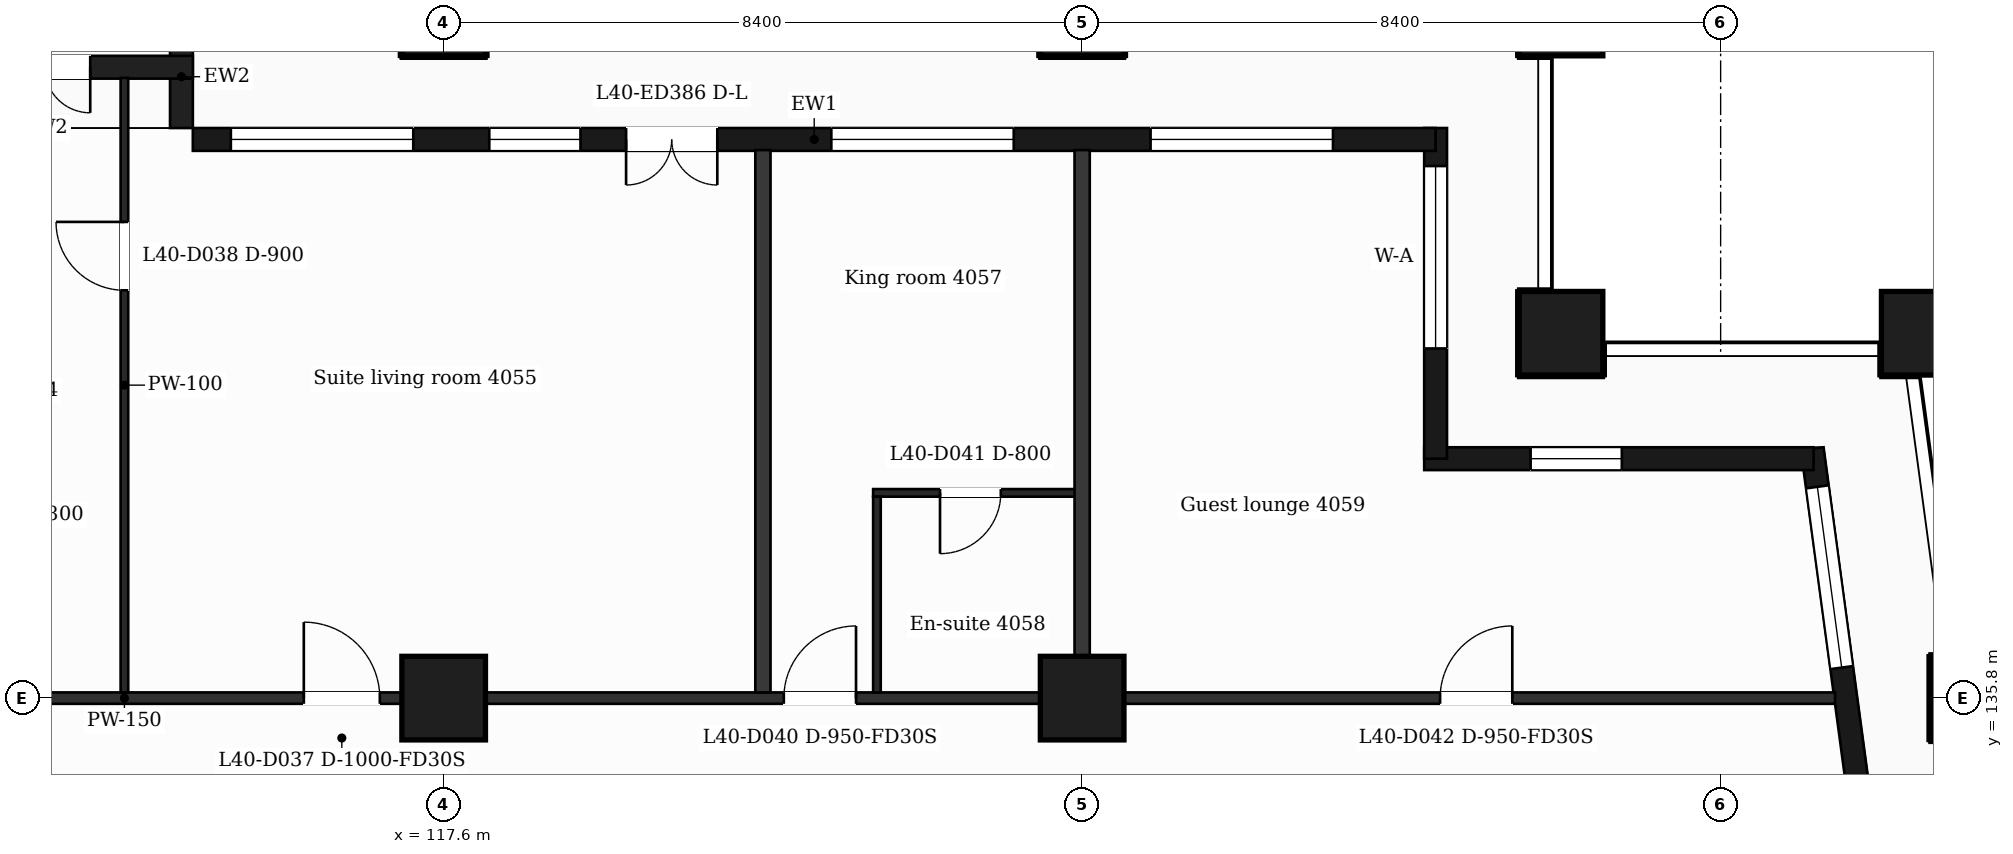
"""IFC4 building model, lengths in metres.
Left out: names, types, materials, properties, quantities, classifications, styles, units other than length and angle.
Written with IfcOpenShell. Run it as: python <this file> out.ifc"""

import sys

from ifc_helpers import new_model, si_unit, direction, frame, frame_2d, origin, origin_2d, place, context, subcontext, project, spatial, rectangle, extrude, element, fill, save


model = new_model("IFC4")
c1 = context("Model", 3, precision=1e-05, world=origin(), true_north=direction((0.0, 1.0)))
c2 = subcontext(c1, "Body", "Model", "MODEL_VIEW")
j1 = project(units=[si_unit("LENGTHUNIT", "METRE"), si_unit("PLANEANGLEUNIT", "RADIAN")], contexts=[c1])
p1 = place(None, origin())
s1 = spatial("IfcSite", under=j1, at=p1, CompositionType="ELEMENT")
p2 = place(p1, origin())
s2 = spatial("IfcBuilding", under=s1, at=p2, CompositionType="ELEMENT")
p3 = place(p2, frame((0.0, 0.0, 170.0)))
s3 = spatial("IfcBuildingStorey", under=s2, at=p3, CompositionType="ELEMENT", Elevation=170.0)
for number, where, z_axis, x_axis in (
    (1, (132.3, 140.6, 0.0), (0.0, 0.0, 1.0), (1.0, 0.0, 0.0)),
    (2, (137.065, 140.6, 0.0), (0.0, 0.0, 1.0), (1.0, 0.0, 0.0)),
    (3, (117.6, 135.8, 0.0), (0.0, 0.0, 1.0), (1.0, 0.0, 0.0)),
    (4, (126.0, 135.8, 0.0), (0.0, 0.0, 1.0), (1.0, 0.0, 0.0)),
    (5, (137.711, 135.8, 0.0), (0.0, 0.0, 1.0), (1.0, 0.0, 0.0)),
    (6, (117.6, 144.8, 0.0), (0.0, 0.0, 1.0), (1.0, 0.0, 0.0)),
    (7, (126.0, 144.8, 0.0), (0.0, 0.0, 1.0), (1.0, 0.0, 0.0)),
    (8, (132.3, 144.8, 0.0), (0.0, 0.0, 1.0), (1.0, 0.0, 0.0)),
):
    element("IfcColumn", number, at=place(p3, frame(where, z_axis=z_axis, x_axis=x_axis)), inside=s3, PredefinedType="COLUMN", context=c2, shape_type="SweptSolid", body=[
        extrude(rectangle(XDim=1.1, YDim=1.1, at=origin_2d()), origin(), (0.0, 0.0, 1.0), 3.7),
    ])
p4 = place(p3, frame((136.504, 132.4, 0.0), z_axis=(0.0, 0.0, 1.0), x_axis=(-0.133399697462, 0.99106231929, 0.0)))
e9 = element("IfcWall", 9, at=p4, inside=s3, PredefinedType="SOLIDWALL", context=c2, shape_type="SweptSolid", body=[
    extrude(rectangle(XDim=6.74, YDim=0.3, at=frame_2d((3.37, 0.0))), origin(), (0.0, 0.0, 1.0), 3.38),
])
p5 = place(p4, frame((1.115, 0.0, 0.0)))
e10 = element("IfcOpeningElement", 10, at=p5, cuts=e9, PredefinedType="OPENING", context=c2, shape_type="SweptSolid", body=[
    extrude(rectangle(XDim=1.2, YDim=2.4, at=frame_2d((0.6, 1.2))), frame((0.0, 0.16, 0.0), z_axis=(0.0, -1.0, 0.0), x_axis=(1.0, 0.0, 0.0)), (0.0, 0.0, 1.0), 0.32),
])
p6 = place(p4, frame((3.835, 0.0, 0.9)))
e11 = element("IfcOpeningElement", 11, at=p6, cuts=e9, PredefinedType="OPENING", context=c2, shape_type="SweptSolid", body=[
    extrude(rectangle(XDim=2.4, YDim=2.1, at=frame_2d((1.2, 1.05))), frame((0.0, 0.16, 0.0), z_axis=(0.0, -1.0, 0.0), x_axis=(1.0, 0.0, 0.0)), (0.0, 0.0, 1.0), 0.32),
])
p7 = place(p3, frame((135.623, 138.95, 0.0), z_axis=(0.0, 0.0, 1.0), x_axis=(-1.0, 0.0, 0.0)))
e12 = element("IfcWall", 12, at=p7, inside=s3, PredefinedType="SOLIDWALL", context=c2, shape_type="SweptSolid", body=[
    extrude(rectangle(XDim=5.123, YDim=0.3, at=frame_2d((2.561, 0.0))), origin(), (0.0, 0.0, 1.0), 3.38),
])
p8 = place(p7, frame((2.523, 0.0, 0.9)))
e13 = element("IfcOpeningElement", 13, at=p8, cuts=e12, PredefinedType="OPENING", context=c2, shape_type="SweptSolid", body=[
    extrude(rectangle(XDim=1.2, YDim=2.1, at=frame_2d((0.6, 1.05))), frame((0.0, 0.16, 0.0), z_axis=(0.0, -1.0, 0.0), x_axis=(1.0, 0.0, 0.0)), (0.0, 0.0, 1.0), 0.32),
])
p9 = place(p3, frame((130.65, 138.95, 0.0), z_axis=(0.0, 0.0, 1.0), x_axis=(0.0, 1.0, 0.0)))
e14 = element("IfcWall", 14, at=p9, inside=s3, PredefinedType="SOLIDWALL", context=c2, shape_type="SweptSolid", body=[
    extrude(rectangle(XDim=4.35, YDim=0.3, at=frame_2d((2.175, 0.0))), origin(), (0.0, 0.0, 1.0), 3.38),
])
p10 = place(p9, frame((1.45, 0.0, 0.9)))
e15 = element("IfcOpeningElement", 15, at=p10, cuts=e14, PredefinedType="OPENING", context=c2, shape_type="SweptSolid", body=[
    extrude(rectangle(XDim=2.4, YDim=2.1, at=frame_2d((1.2, 1.05))), frame((0.0, 0.16, 0.0), z_axis=(0.0, -1.0, 0.0), x_axis=(1.0, 0.0, 0.0)), (0.0, 0.0, 1.0), 0.32),
])
p11 = place(p3, frame((130.65, 143.15, 0.0), z_axis=(0.0, 0.0, 1.0), x_axis=(-1.0, 0.0, 0.0)))
e16 = element("IfcWall", 16, at=p11, inside=s3, PredefinedType="SOLIDWALL", context=c2, shape_type="SweptSolid", body=[
    extrude(rectangle(XDim=16.35, YDim=0.3, at=frame_2d((8.175, 0.0))), origin(), (0.0, 0.0, 1.0), 3.38),
])
p12 = place(p11, frame((1.35, 0.0, 0.9)))
e17 = element("IfcOpeningElement", 17, at=p12, cuts=e16, PredefinedType="OPENING", context=c2, shape_type="SweptSolid", body=[
    extrude(rectangle(XDim=2.4, YDim=2.1, at=frame_2d((1.2, 1.05))), frame((0.0, 0.16, 0.0), z_axis=(0.0, -1.0, 0.0), x_axis=(1.0, 0.0, 0.0)), (0.0, 0.0, 1.0), 0.32),
])
p13 = place(p11, frame((5.55, 0.0, 0.9)))
e18 = element("IfcOpeningElement", 18, at=p13, cuts=e16, PredefinedType="OPENING", context=c2, shape_type="SweptSolid", body=[
    extrude(rectangle(XDim=2.4, YDim=2.1, at=frame_2d((1.2, 1.05))), frame((0.0, 0.16, 0.0), z_axis=(0.0, -1.0, 0.0), x_axis=(1.0, 0.0, 0.0)), (0.0, 0.0, 1.0), 0.32),
])
p14 = place(p11, frame((9.45, 0.0, 0.0)))
e19 = element("IfcOpeningElement", 19, at=p14, cuts=e16, PredefinedType="OPENING", context=c2, shape_type="SweptSolid", body=[
    extrude(rectangle(XDim=1.2, YDim=2.4, at=frame_2d((0.6, 1.2))), frame((0.0, 0.16, 0.0), z_axis=(0.0, -1.0, 0.0), x_axis=(1.0, 0.0, 0.0)), (0.0, 0.0, 1.0), 0.32),
])
p15 = place(p11, frame((11.25, 0.0, 0.9)))
e20 = element("IfcOpeningElement", 20, at=p15, cuts=e16, PredefinedType="OPENING", context=c2, shape_type="SweptSolid", body=[
    extrude(rectangle(XDim=1.2, YDim=2.1, at=frame_2d((0.6, 1.05))), frame((0.0, 0.16, 0.0), z_axis=(0.0, -1.0, 0.0), x_axis=(1.0, 0.0, 0.0)), (0.0, 0.0, 1.0), 0.32),
])
p16 = place(p11, frame((13.45, 0.0, 0.9)))
e21 = element("IfcOpeningElement", 21, at=p16, cuts=e16, PredefinedType="OPENING", context=c2, shape_type="SweptSolid", body=[
    extrude(rectangle(XDim=2.4, YDim=2.1, at=frame_2d((1.2, 1.05))), frame((0.0, 0.16, 0.0), z_axis=(0.0, -1.0, 0.0), x_axis=(1.0, 0.0, 0.0)), (0.0, 0.0, 1.0), 0.32),
])
p17 = place(p3, frame((114.15, 143.3, 0.0), z_axis=(0.0, 0.0, 1.0), x_axis=(0.0, 1.0, 0.0)))
e22 = element("IfcWall", 22, at=p17, inside=s3, PredefinedType="SOLIDWALL", context=c2, shape_type="SweptSolid", body=[
    extrude(rectangle(XDim=1.35, YDim=0.3, at=frame_2d((0.675, 0.0))), origin(), (0.0, 0.0, 1.0), 3.38),
])
p18 = place(p3, frame((114.3, 144.1, 0.0), z_axis=(0.0, 0.0, 1.0), x_axis=(-1.0, 0.0, 0.0)))
e23 = element("IfcWall", 23, at=p18, inside=s3, PredefinedType="SOLIDWALL", context=c2, shape_type="SweptSolid", body=[
    extrude(rectangle(XDim=3.9, YDim=0.3, at=frame_2d((1.95, 0.0))), origin(), (0.0, 0.0, 1.0), 3.38),
])
p19 = place(p18, frame((1.35, 0.0, 0.0)))
e24 = element("IfcOpeningElement", 24, at=p19, cuts=e23, PredefinedType="OPENING", context=c2, shape_type="SweptSolid", body=[
    extrude(rectangle(XDim=1.2, YDim=2.4, at=frame_2d((0.6, 1.2))), frame((0.0, 0.16, 0.0), z_axis=(0.0, -1.0, 0.0), x_axis=(1.0, 0.0, 0.0)), (0.0, 0.0, 1.0), 0.32),
])
p20 = place(p3, frame((90.895, 135.8, 0.0), z_axis=(0.0, 0.0, 1.0), x_axis=(1.0, 0.0, 0.0)))
e25 = element("IfcWall", 25, at=p20, inside=s3, PredefinedType="PARTITIONING", context=c2, shape_type="SweptSolid", body=[
    extrude(rectangle(XDim=45.011, YDim=0.15, at=frame_2d((22.505, 0.0))), origin(), (0.0, 0.0, 1.0), 3.38),
])
p21 = place(p20, frame((7.675, 0.0, 0.0)))
e26 = element("IfcOpeningElement", 26, at=p21, cuts=e25, PredefinedType="OPENING", context=c2, shape_type="SweptSolid", body=[
    extrude(rectangle(XDim=1.0, YDim=2.1, at=frame_2d((0.5, 1.05))), frame((0.0, 0.085, 0.0), z_axis=(0.0, -1.0, 0.0), x_axis=(1.0, 0.0, 0.0)), (0.0, 0.0, 1.0), 0.17),
])
p22 = place(p20, frame((11.505, 0.0, 0.0)))
e27 = element("IfcOpeningElement", 27, at=p22, cuts=e25, PredefinedType="OPENING", context=c2, shape_type="SweptSolid", body=[
    extrude(rectangle(XDim=1.0, YDim=2.1, at=frame_2d((0.5, 1.05))), frame((0.0, 0.085, 0.0), z_axis=(0.0, -1.0, 0.0), x_axis=(1.0, 0.0, 0.0)), (0.0, 0.0, 1.0), 0.17),
])
p23 = place(p20, frame((24.865, 0.0, 0.0)))
e28 = element("IfcOpeningElement", 28, at=p23, cuts=e25, PredefinedType="OPENING", context=c2, shape_type="SweptSolid", body=[
    extrude(rectangle(XDim=1.0, YDim=2.1, at=frame_2d((0.5, 1.05))), frame((0.0, 0.085, 0.0), z_axis=(0.0, -1.0, 0.0), x_axis=(1.0, 0.0, 0.0)), (0.0, 0.0, 1.0), 0.17),
])
p24 = place(p20, frame((31.18, 0.0, 0.0)))
e29 = element("IfcOpeningElement", 29, at=p24, cuts=e25, PredefinedType="OPENING", context=c2, shape_type="SweptSolid", body=[
    extrude(rectangle(XDim=0.95, YDim=2.1, at=frame_2d((0.475, 1.05))), frame((0.0, 0.085, 0.0), z_axis=(0.0, -1.0, 0.0), x_axis=(1.0, 0.0, 0.0)), (0.0, 0.0, 1.0), 0.17),
])
p25 = place(p20, frame((39.814, 0.0, 0.0)))
e30 = element("IfcOpeningElement", 30, at=p25, cuts=e25, PredefinedType="OPENING", context=c2, shape_type="SweptSolid", body=[
    extrude(rectangle(XDim=0.95, YDim=2.1, at=frame_2d((0.475, 1.05))), frame((0.0, 0.085, 0.0), z_axis=(0.0, -1.0, 0.0), x_axis=(1.0, 0.0, 0.0)), (0.0, 0.0, 1.0), 0.17),
])
p26 = place(p3, frame((123.25, 138.5, 0.0), z_axis=(0.0, 0.0, 1.0), x_axis=(1.0, 0.0, 0.0)))
e31 = element("IfcWall", 31, at=p26, inside=s3, PredefinedType="PARTITIONING", context=c2, shape_type="SweptSolid", body=[
    extrude(rectangle(XDim=2.75, YDim=0.1, at=frame_2d((1.375, 0.0))), origin(), (0.0, 0.0, 1.0), 3.38),
])
p27 = place(p26, frame((0.88, 0.0, 0.0)))
e32 = element("IfcOpeningElement", 32, at=p27, cuts=e31, PredefinedType="OPENING", context=c2, shape_type="SweptSolid", body=[
    extrude(rectangle(XDim=0.8, YDim=2.1, at=frame_2d((0.4, 1.05))), frame((0.0, 0.06, 0.0), z_axis=(0.0, -1.0, 0.0), x_axis=(1.0, 0.0, 0.0)), (0.0, 0.0, 1.0), 0.12),
])
p28 = place(p3, frame((113.4, 135.875, 0.0), z_axis=(0.0, 0.0, 1.0), x_axis=(0.0, 1.0, 0.0)))
e33 = element("IfcWall", 33, at=p28, inside=s3, PredefinedType="PARTITIONING", context=c2, shape_type="SweptSolid", body=[
    extrude(rectangle(XDim=8.085, YDim=0.1, at=frame_2d((4.042, 0.0))), origin(), (0.0, 0.0, 1.0), 3.38),
])
p29 = place(p28, frame((5.29, 0.0, 0.0)))
e34 = element("IfcOpeningElement", 34, at=p29, cuts=e33, PredefinedType="OPENING", context=c2, shape_type="SweptSolid", body=[
    extrude(rectangle(XDim=0.9, YDim=2.1, at=frame_2d((0.45, 1.05))), frame((0.0, 0.06, 0.0), z_axis=(0.0, -1.0, 0.0), x_axis=(1.0, 0.0, 0.0)), (0.0, 0.0, 1.0), 0.12),
])
p30 = place(p3, frame((121.8, 135.875, 0.0), z_axis=(0.0, 0.0, 1.0), x_axis=(0.0, 1.0, 0.0)))
e35 = element("IfcWall", 35, at=p30, inside=s3, PredefinedType="PARTITIONING", context=c2, shape_type="SweptSolid", body=[
    extrude(rectangle(XDim=7.135, YDim=0.2, at=frame_2d((3.567, 0.0))), origin(), (0.0, 0.0, 1.0), 3.38),
])
p31 = place(p3, frame((123.3, 135.875, 0.0), z_axis=(0.0, 0.0, 1.0), x_axis=(0.0, 1.0, 0.0)))
e36 = element("IfcWall", 36, at=p31, inside=s3, PredefinedType="PARTITIONING", context=c2, shape_type="SweptSolid", body=[
    extrude(rectangle(XDim=2.575, YDim=0.1, at=frame_2d((1.288, 0.0))), origin(), (0.0, 0.0, 1.0), 3.38),
])
p32 = place(p3, frame((126.0, 135.875, 0.0), z_axis=(0.0, 0.0, 1.0), x_axis=(0.0, 1.0, 0.0)))
e37 = element("IfcWall", 37, at=p32, inside=s3, PredefinedType="PARTITIONING", context=c2, shape_type="SweptSolid", body=[
    extrude(rectangle(XDim=7.135, YDim=0.2, at=frame_2d((3.567, 0.0))), origin(), (0.0, 0.0, 1.0), 3.38),
])
p33 = place(p6, origin())
e38 = element("IfcWindow", 38, at=p33, inside=s3, PartitioningType="SINGLE_PANEL", PredefinedType="WINDOW", context=c2, shape_type="SweptSolid", body=[
    extrude(rectangle(XDim=2.4, YDim=2.1, at=frame_2d((1.2, 1.05))), frame((0.0, 0.03, 0.0), z_axis=(0.0, -1.0, 0.0), x_axis=(1.0, 0.0, 0.0)), (0.0, 0.0, 1.0), 0.06),
])
fill(e11, e38)
p34 = place(p8, origin())
e39 = element("IfcWindow", 39, at=p34, inside=s3, PartitioningType="SINGLE_PANEL", PredefinedType="WINDOW", context=c2, shape_type="SweptSolid", body=[
    extrude(rectangle(XDim=1.2, YDim=2.1, at=frame_2d((0.6, 1.05))), frame((0.0, 0.03, 0.0), z_axis=(0.0, -1.0, 0.0), x_axis=(1.0, 0.0, 0.0)), (0.0, 0.0, 1.0), 0.06),
])
fill(e13, e39)
p35 = place(p10, origin())
e40 = element("IfcWindow", 40, at=p35, inside=s3, PartitioningType="SINGLE_PANEL", PredefinedType="WINDOW", context=c2, shape_type="SweptSolid", body=[
    extrude(rectangle(XDim=2.4, YDim=2.1, at=frame_2d((1.2, 1.05))), frame((0.0, 0.03, 0.0), z_axis=(0.0, -1.0, 0.0), x_axis=(1.0, 0.0, 0.0)), (0.0, 0.0, 1.0), 0.06),
])
fill(e15, e40)
p36 = place(p12, origin())
e41 = element("IfcWindow", 41, at=p36, inside=s3, PartitioningType="SINGLE_PANEL", PredefinedType="WINDOW", context=c2, shape_type="SweptSolid", body=[
    extrude(rectangle(XDim=2.4, YDim=2.1, at=frame_2d((1.2, 1.05))), frame((0.0, 0.03, 0.0), z_axis=(0.0, -1.0, 0.0), x_axis=(1.0, 0.0, 0.0)), (0.0, 0.0, 1.0), 0.06),
])
fill(e17, e41)
p37 = place(p13, origin())
e42 = element("IfcWindow", 42, at=p37, inside=s3, PartitioningType="SINGLE_PANEL", PredefinedType="WINDOW", context=c2, shape_type="SweptSolid", body=[
    extrude(rectangle(XDim=2.4, YDim=2.1, at=frame_2d((1.2, 1.05))), frame((0.0, 0.03, 0.0), z_axis=(0.0, -1.0, 0.0), x_axis=(1.0, 0.0, 0.0)), (0.0, 0.0, 1.0), 0.06),
])
fill(e18, e42)
p38 = place(p14, origin())
e43 = element("IfcDoor", 43, at=p38, inside=s3, OperationType="DOUBLE_DOOR_SINGLE_SWING", PredefinedType="DOOR", context=c2, shape_type="SweptSolid", body=[
    extrude(rectangle(XDim=1.2, YDim=2.4, at=frame_2d((0.6, 1.2))), frame((0.0, 0.025, 0.0), z_axis=(0.0, -1.0, 0.0), x_axis=(1.0, 0.0, 0.0)), (0.0, 0.0, 1.0), 0.05),
])
fill(e19, e43)
p39 = place(p15, origin())
e44 = element("IfcWindow", 44, at=p39, inside=s3, PartitioningType="SINGLE_PANEL", PredefinedType="WINDOW", context=c2, shape_type="SweptSolid", body=[
    extrude(rectangle(XDim=1.2, YDim=2.1, at=frame_2d((0.6, 1.05))), frame((0.0, 0.03, 0.0), z_axis=(0.0, -1.0, 0.0), x_axis=(1.0, 0.0, 0.0)), (0.0, 0.0, 1.0), 0.06),
])
fill(e20, e44)
p40 = place(p16, origin())
e45 = element("IfcWindow", 45, at=p40, inside=s3, PartitioningType="SINGLE_PANEL", PredefinedType="WINDOW", context=c2, shape_type="SweptSolid", body=[
    extrude(rectangle(XDim=2.4, YDim=2.1, at=frame_2d((1.2, 1.05))), frame((0.0, 0.03, 0.0), z_axis=(0.0, -1.0, 0.0), x_axis=(1.0, 0.0, 0.0)), (0.0, 0.0, 1.0), 0.06),
])
fill(e21, e45)
p41 = place(p19, origin())
e46 = element("IfcDoor", 46, at=p41, inside=s3, OperationType="DOUBLE_DOOR_SINGLE_SWING", PredefinedType="DOOR", context=c2, shape_type="SweptSolid", body=[
    extrude(rectangle(XDim=1.2, YDim=2.4, at=frame_2d((0.6, 1.2))), frame((0.0, 0.025, 0.0), z_axis=(0.0, -1.0, 0.0), x_axis=(1.0, 0.0, 0.0)), (0.0, 0.0, 1.0), 0.05),
])
fill(e24, e46)
p42 = place(p23, origin())
e47 = element("IfcDoor", 47, at=p42, inside=s3, OperationType="SINGLE_SWING_LEFT", PredefinedType="DOOR", context=c2, shape_type="SweptSolid", body=[
    extrude(rectangle(XDim=1.0, YDim=2.1, at=frame_2d((0.5, 1.05))), frame((0.0, 0.025, 0.0), z_axis=(0.0, -1.0, 0.0), x_axis=(1.0, 0.0, 0.0)), (0.0, 0.0, 1.0), 0.05),
])
fill(e28, e47)
p43 = place(p29, origin())
e48 = element("IfcDoor", 48, at=p43, inside=s3, OperationType="SINGLE_SWING_RIGHT", PredefinedType="DOOR", context=c2, shape_type="SweptSolid", body=[
    extrude(rectangle(XDim=0.9, YDim=2.1, at=frame_2d((0.45, 1.05))), frame((0.0, 0.025, 0.0), z_axis=(0.0, -1.0, 0.0), x_axis=(1.0, 0.0, 0.0)), (0.0, 0.0, 1.0), 0.05),
])
fill(e34, e48)
p44 = place(p24, origin())
e49 = element("IfcDoor", 49, at=p44, inside=s3, OperationType="SINGLE_SWING_RIGHT", PredefinedType="DOOR", context=c2, shape_type="SweptSolid", body=[
    extrude(rectangle(XDim=0.95, YDim=2.1, at=frame_2d((0.475, 1.05))), frame((0.0, 0.025, 0.0), z_axis=(0.0, -1.0, 0.0), x_axis=(1.0, 0.0, 0.0)), (0.0, 0.0, 1.0), 0.05),
])
fill(e29, e49)
p45 = place(p27, origin())
e50 = element("IfcDoor", 50, at=p45, inside=s3, OperationType="SINGLE_SWING_LEFT", PredefinedType="DOOR", context=c2, shape_type="SweptSolid", body=[
    extrude(rectangle(XDim=0.8, YDim=2.1, at=frame_2d((0.4, 1.05))), frame((0.0, 0.025, 0.0), z_axis=(0.0, -1.0, 0.0), x_axis=(1.0, 0.0, 0.0)), (0.0, 0.0, 1.0), 0.05),
])
fill(e32, e50)
p46 = place(p25, origin())
e51 = element("IfcDoor", 51, at=p46, inside=s3, OperationType="SINGLE_SWING_RIGHT", PredefinedType="DOOR", context=c2, shape_type="SweptSolid", body=[
    extrude(rectangle(XDim=0.95, YDim=2.1, at=frame_2d((0.475, 1.05))), frame((0.0, 0.025, 0.0), z_axis=(0.0, -1.0, 0.0), x_axis=(1.0, 0.0, 0.0)), (0.0, 0.0, 1.0), 0.05),
])
fill(e30, e51)
save(model, sys.argv[1])
